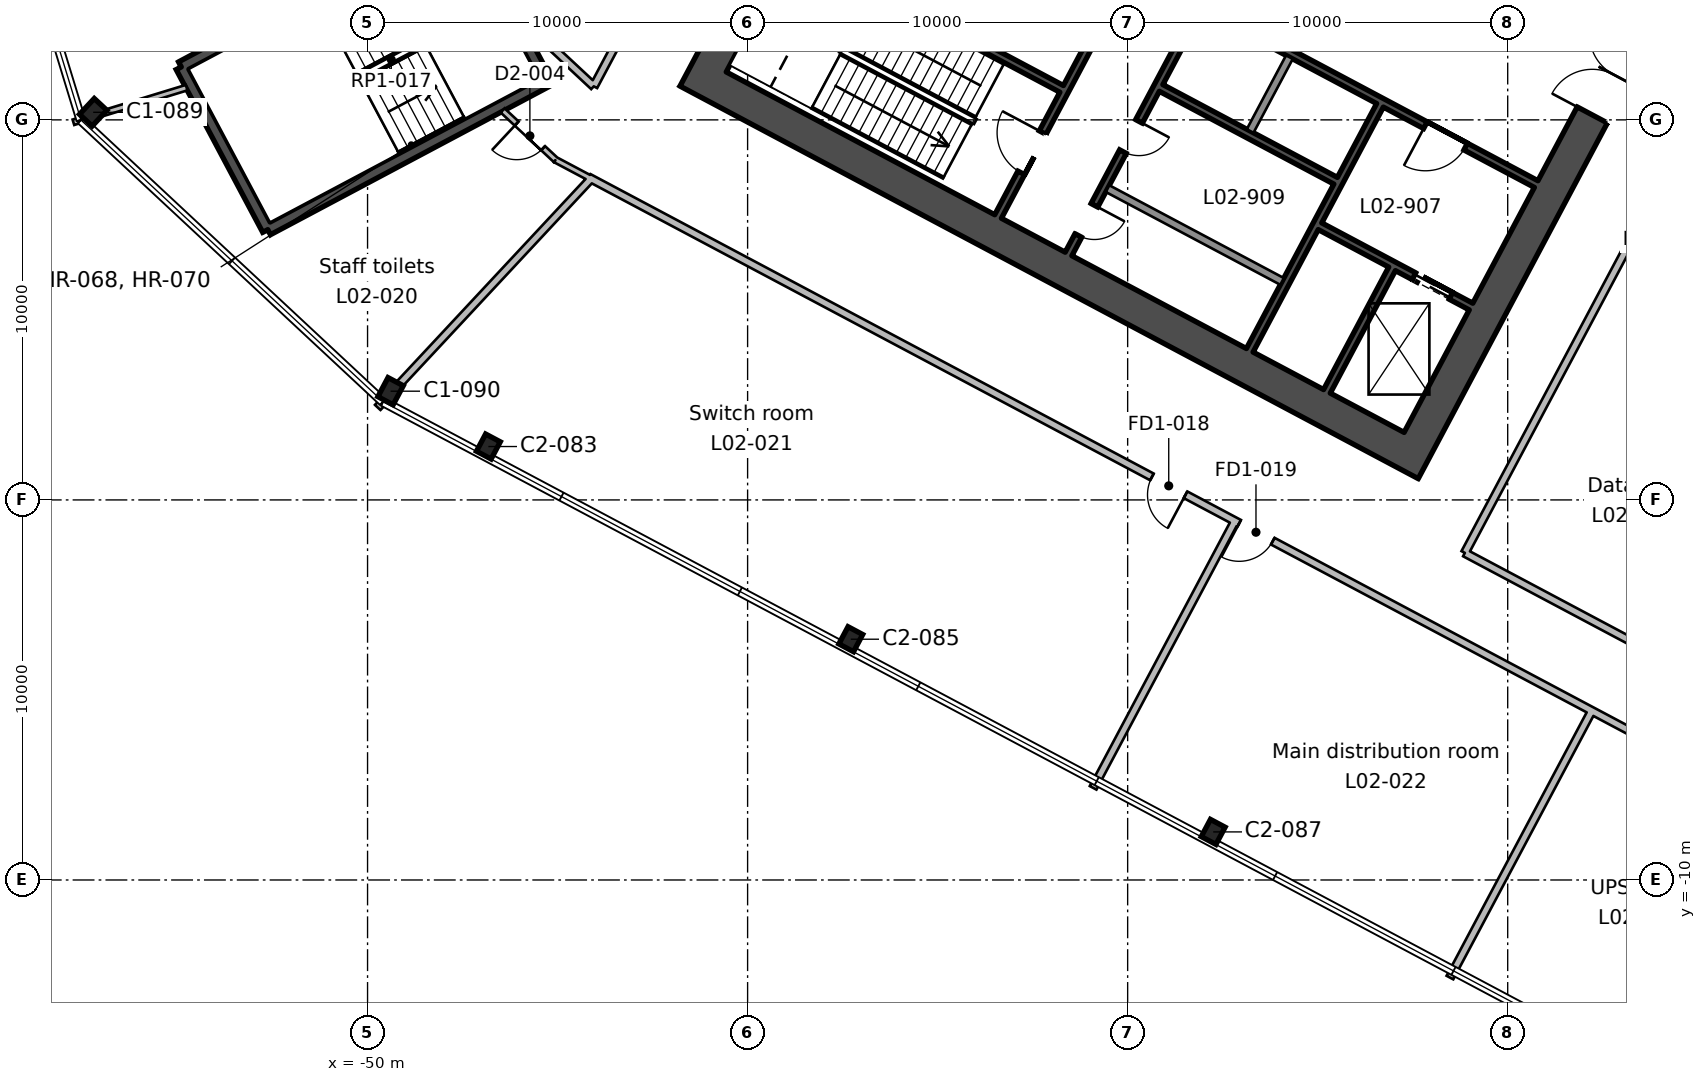
"""IFC4 building model, lengths in metres.
Left out: names, types, materials, properties, quantities, classifications, styles, units other than length and angle.
Written with IfcOpenShell. Run it as: python <this file> out.ifc"""

import sys

from ifc_helpers import new_model, si_unit, direction, frame, frame_2d, origin, origin_2d, place, context, subcontext, project, spatial, rectangle, i_section, extrude, element, fill, save


model = new_model("IFC4")
c1 = context("Model", 3, precision=1e-05, world=origin(), true_north=direction((0.0, 1.0)))
c2 = subcontext(c1, "Body", "Model", "MODEL_VIEW")
j1 = project(units=[si_unit("LENGTHUNIT", "METRE"), si_unit("PLANEANGLEUNIT", "RADIAN")], contexts=[c1])
p1 = place(None, origin())
s1 = spatial("IfcSite", under=j1, at=p1, CompositionType="ELEMENT")
p2 = place(p1, origin())
s2 = spatial("IfcBuilding", under=s1, at=p2, CompositionType="ELEMENT")
p3 = place(p2, frame((0.0, 0.0, 12.2)))
s3 = spatial("IfcBuildingStorey", under=s2, at=p3, CompositionType="ELEMENT", Elevation=12.2)
for number, where, z_axis, x_axis in (
    (1, (-27.749, -8.735, 0.0), (0.0, 0.0, 1.0), (0.883, -0.469, 0.0)),
    (2, (-37.285, -3.665, 0.0), (0.0, 0.0, 1.0), (0.883, -0.469, 0.0)),
    (3, (-46.821, 1.405, 0.0), (0.0, 0.0, 1.0), (0.883, -0.469, 0.0)),
):
    element("IfcColumn", number, at=place(p3, frame(where, z_axis=z_axis, x_axis=x_axis)), inside=s3, PredefinedType="COLUMN", context=c2, shape_type="SweptSolid", body=[
        extrude(i_section(OverallWidth=0.437, OverallDepth=0.513, WebThickness=0.061, FlangeThickness=0.097, FilletRadius=0.015, at=origin_2d()), origin(), (0.0, 0.0, 1.0), 5.4),
    ])
for number, where, z_axis, x_axis in (
    (4, (-49.394, 2.861, 0.0), (0.0, 0.0, 1.0), (0.883, -0.469, 0.0)),
    (5, (-57.219, 10.199, 0.0), (0.0, 0.0, 1.0), (0.731, -0.682, 0.0)),
):
    element("IfcColumn", number, at=place(p3, frame(where, z_axis=z_axis, x_axis=x_axis)), inside=s3, PredefinedType="COLUMN", context=c2, shape_type="SweptSolid", body=[
        extrude(i_section(OverallWidth=0.455, OverallDepth=0.569, WebThickness=0.078, FlangeThickness=0.125, FilletRadius=0.015, at=origin_2d()), origin(), (0.0, 0.0, 1.0), 5.4),
    ])
p4 = place(p3, frame((-13.362, 18.43, 0.0), z_axis=(0.0, 0.0, 1.0), x_axis=(-0.46947084998, -0.882947971864, 0.0)))
e6 = element("IfcWall", 6, at=p4, inside=s3, PredefinedType="SHEAR", context=c2, shape_type="SweptSolid", body=[
    extrude(rectangle(XDim=20.0, YDim=0.9, at=frame_2d((10.0, 0.0))), origin(), (0.0, 0.0, 1.0), 5.4),
])
p5 = place(p4, frame((7.0, 0.0, 0.0)))
e7 = element("IfcOpeningElement", 7, at=p5, cuts=e6, PredefinedType="OPENING", context=c2, shape_type="SweptSolid", body=[
    extrude(rectangle(XDim=2.4, YDim=2.4, at=frame_2d((1.2, 1.2))), frame((0.0, 0.46, 0.0), z_axis=(0.0, -1.0, 0.0), x_axis=(1.0, 0.0, 0.0)), (0.0, 0.0, 1.0), 0.92),
])
p6 = place(p3, frame((-31.992, 28.336, 0.0), z_axis=(0.0, 0.0, 1.0), x_axis=(-0.46947084998, -0.882947971864, 0.0)))
e8 = element("IfcWall", 8, at=p6, inside=s3, PredefinedType="SHEAR", context=c2, shape_type="SweptSolid", body=[
    extrude(rectangle(XDim=20.0, YDim=0.9, at=frame_2d((10.0, 0.0))), origin(), (0.0, 0.0, 1.0), 5.4),
])
p7 = place(p6, frame((10.6, 0.0, 0.0)))
e9 = element("IfcOpeningElement", 9, at=p7, cuts=e8, PredefinedType="OPENING", context=c2, shape_type="SweptSolid", body=[
    extrude(rectangle(XDim=2.4, YDim=2.4, at=frame_2d((1.2, 1.2))), frame((0.0, 0.46, 0.0), z_axis=(0.0, -1.0, 0.0), x_axis=(1.0, 0.0, 0.0)), (0.0, 0.0, 1.0), 0.92),
])
p8 = place(p3, frame((-22.937, 1.38, 0.0), z_axis=(0.0, 0.0, 1.0), x_axis=(-0.88295276571, 0.46946183394, 0.0)))
e10 = element("IfcWall", 10, at=p8, inside=s3, PredefinedType="SHEAR", context=c2, shape_type="SweptSolid", body=[
    extrude(rectangle(XDim=20.2, YDim=0.9, at=frame_2d((10.1, 0.0))), origin(), (0.0, 0.0, 1.0), 5.4),
])
p9 = place(p3, frame((-23.043, 6.08, 0.0), z_axis=(0.0, 0.0, 1.0), x_axis=(-0.469494272526, -0.882935517501, 0.0)))
e11 = element("IfcWall", 11, at=p9, inside=s3, PredefinedType="SHEAR", context=c2, shape_type="SweptSolid", body=[
    extrude(rectangle(XDim=3.65, YDim=0.2, at=frame_2d((1.825, 0.0))), origin(), (0.0, 0.0, 1.0), 5.4),
])
p10 = place(p3, frame((-23.36, 10.382, 0.0), z_axis=(0.0, 0.0, 1.0), x_axis=(-0.469480409012, -0.88294288918, 0.0)))
e12 = element("IfcWall", 12, at=p10, inside=s3, PredefinedType="SHEAR", context=c2, shape_type="SweptSolid", body=[
    extrude(rectangle(XDim=7.3, YDim=0.2, at=frame_2d((3.65, 0.0))), origin(), (0.0, 0.0, 1.0), 5.4),
])
p11 = place(p3, frame((-25.744, 11.65, 0.0), z_axis=(0.0, 0.0, 1.0), x_axis=(-0.469487830541, -0.882938942948, 0.0)))
e13 = element("IfcWall", 13, at=p11, inside=s3, PredefinedType="SOLIDWALL", context=c2, shape_type="SweptSolid", body=[
    extrude(rectangle(XDim=2.2, YDim=0.2, at=frame_2d((1.1, 0.0))), origin(), (0.0, 0.0, 1.0), 5.4),
])
p12 = place(p3, frame((-28.128, 12.917, 0.0), z_axis=(0.0, 0.0, 1.0), x_axis=(-0.469454336211, -0.882956752176, 0.0)))
e14 = element("IfcWall", 14, at=p12, inside=s3, PredefinedType="SHEAR", context=c2, shape_type="SweptSolid", body=[
    extrude(rectangle(XDim=7.3, YDim=0.2, at=frame_2d((3.65, 0.0))), origin(), (0.0, 0.0, 1.0), 5.4),
])
p13 = place(p12, frame((3.35, 0.0, 0.0)))
e15 = element("IfcOpeningElement", 15, at=p13, cuts=e14, PredefinedType="OPENING", context=c2, shape_type="SweptSolid", body=[
    extrude(rectangle(XDim=0.9, YDim=2.1, at=frame_2d((0.45, 1.05))), frame((0.0, 0.11, 0.0), z_axis=(0.0, -1.0, 0.0), x_axis=(1.0, 0.0, 0.0)), (0.0, 0.0, 1.0), 0.22),
])
p14 = place(p12, frame((5.85, 0.0, 0.0)))
e16 = element("IfcOpeningElement", 16, at=p14, cuts=e14, PredefinedType="OPENING", context=c2, shape_type="SweptSolid", body=[
    extrude(rectangle(XDim=0.9, YDim=2.1, at=frame_2d((0.45, 1.05))), frame((0.0, 0.11, 0.0), z_axis=(0.0, -1.0, 0.0), x_axis=(1.0, 0.0, 0.0)), (0.0, 0.0, 1.0), 0.22),
])
p15 = place(p3, frame((-29.982, 13.903, 0.0), z_axis=(0.0, 0.0, 1.0), x_axis=(-0.469454336211, -0.882956752176, 0.0)))
e17 = element("IfcWall", 17, at=p15, inside=s3, PredefinedType="SHEAR", context=c2, shape_type="SweptSolid", body=[
    extrude(rectangle(XDim=7.3, YDim=0.2, at=frame_2d((3.65, 0.0))), origin(), (0.0, 0.0, 1.0), 5.4),
])
p16 = place(p15, frame((4.8, 0.0, 0.0)))
e18 = element("IfcOpeningElement", 18, at=p16, cuts=e17, PredefinedType="OPENING", context=c2, shape_type="SweptSolid", body=[
    extrude(rectangle(XDim=1.2, YDim=2.1, at=frame_2d((0.6, 1.05))), frame((0.0, 0.11, 0.0), z_axis=(0.0, -1.0, 0.0), x_axis=(1.0, 0.0, 0.0)), (0.0, 0.0, 1.0), 0.22),
])
p17 = place(p3, frame((-19.252, 8.311, 0.0), z_axis=(0.0, 0.0, 1.0), x_axis=(-0.882955722218, 0.469456273365, 0.0)))
e19 = element("IfcWall", 19, at=p17, inside=s3, PredefinedType="SHEAR", context=c2, shape_type="SweptSolid", body=[
    extrude(rectangle(XDim=10.0, YDim=0.2, at=frame_2d((5.0, 0.0))), origin(), (0.0, 0.0, 1.0), 5.4),
])
p18 = place(p17, frame((2.1, 0.0, 0.0)))
e20 = element("IfcOpeningElement", 20, at=p18, cuts=e19, PredefinedType="OPENING", context=c2, shape_type="SweptSolid", body=[
    extrude(rectangle(XDim=1.2, YDim=2.1, at=frame_2d((0.6, 1.05))), frame((0.0, 0.11, 0.0), z_axis=(0.0, -1.0, 0.0), x_axis=(1.0, 0.0, 0.0)), (0.0, 0.0, 1.0), 0.22),
])
p19 = place(p3, frame((-24.528, 8.398, 0.0), z_axis=(0.0, 0.0, 1.0), x_axis=(-0.882953967957, 0.469459572775, 0.0)))
e21 = element("IfcWall", 21, at=p19, inside=s3, PredefinedType="SHEAR", context=c2, shape_type="SweptSolid", body=[
    extrude(rectangle(XDim=5.2, YDim=0.2, at=frame_2d((2.6, 0.0))), origin(), (0.0, 0.0, 1.0), 5.4),
])
p20 = place(p3, frame((-20.965, 5.088, 0.0), z_axis=(0.0, 0.0, 1.0), x_axis=(-0.882925986334, 0.469512196493, 0.0)))
e22 = element("IfcWall", 22, at=p20, inside=s3, PredefinedType="SHEAR", context=c2, shape_type="SweptSolid", body=[
    extrude(rectangle(XDim=4.5, YDim=0.2, at=frame_2d((2.25, 0.0))), origin(), (0.0, 0.0, 1.0), 5.4),
])
p21 = place(p20, frame((0.6, 0.0, 0.0)))
e23 = element("IfcOpeningElement", 23, at=p21, cuts=e22, PredefinedType="OPENING", context=c2, shape_type="SweptSolid", body=[
    extrude(rectangle(XDim=1.1, YDim=2.1, at=frame_2d((0.55, 1.05))), frame((0.0, 0.11, 0.0), z_axis=(0.0, -1.0, 0.0), x_axis=(1.0, 0.0, 0.0)), (0.0, 0.0, 1.0), 0.22),
])
p22 = place(p3, frame((-31.737, 10.816, 0.0), z_axis=(0.0, 0.0, 1.0), x_axis=(-0.882940221191, 0.469485426614, 0.0)))
e24 = element("IfcWall", 24, at=p22, inside=s3, PredefinedType="SHEAR", context=c2, shape_type="SweptSolid", body=[
    extrude(rectangle(XDim=8.0, YDim=0.2, at=frame_2d((4.0, 0.0))), origin(), (0.0, 0.0, 1.0), 5.4),
])
p23 = place(p3, frame((-25.937, 5.75, 0.0), z_axis=(0.0, 0.0, 1.0), x_axis=(-0.882934506056, 0.469496174655, 0.0)))
e25 = element("IfcWall", 25, at=p23, inside=s3, PredefinedType="SOLIDWALL", context=c2, shape_type="SweptSolid", body=[
    extrude(rectangle(XDim=5.2, YDim=0.2, at=frame_2d((2.6, 0.0))), origin(), (0.0, 0.0, 1.0), 5.4),
])
p24 = place(p3, frame((-47.574, 15.29, 0.0), z_axis=(0.0, 0.0, 1.0), x_axis=(0.469443498566, -0.882962514297, 0.0)))
e26 = element("IfcWall", 26, at=p24, inside=s3, PredefinedType="SHEAR", context=c2, shape_type="SweptSolid", body=[
    extrude(rectangle(XDim=4.85, YDim=0.3, at=frame_2d((2.425, 0.0))), origin(), (0.0, 0.0, 1.0), 5.4),
])
p25 = place(p3, frame((-45.297, 11.007, 0.0), z_axis=(0.0, 0.0, 1.0), x_axis=(-0.882951519127, -0.469464178475, 0.0)))
e27 = element("IfcWall", 27, at=p25, inside=s3, PredefinedType="SHEAR", context=c2, shape_type="SweptSolid", body=[
    extrude(rectangle(XDim=8.3, YDim=0.3, at=frame_2d((4.15, 0.0))), origin(), (0.0, 0.0, 1.0), 5.4),
])
p26 = place(p3, frame((-52.626, 7.111, 0.0), z_axis=(0.0, 0.0, 1.0), x_axis=(-0.469464364128, 0.882951420416, 0.0)))
e28 = element("IfcWall", 28, at=p26, inside=s3, PredefinedType="SHEAR", context=c2, shape_type="SweptSolid", body=[
    extrude(rectangle(XDim=4.85, YDim=0.3, at=frame_2d((2.425, 0.0))), origin(), (0.0, 0.0, 1.0), 5.4),
])
p27 = place(p3, frame((-54.903, 11.393, 0.0), z_axis=(0.0, 0.0, 1.0), x_axis=(0.882939326045, 0.469487110071, 0.0)))
e29 = element("IfcWall", 29, at=p27, inside=s3, PredefinedType="SHEAR", context=c2, shape_type="SweptSolid", body=[
    extrude(rectangle(XDim=8.3, YDim=0.3, at=frame_2d((4.15, 0.0))), origin(), (0.0, 0.0, 1.0), 5.4),
])
p28 = place(p27, frame((6.05, 0.0, 0.0)))
e30 = element("IfcOpeningElement", 30, at=p28, cuts=e29, PredefinedType="OPENING", context=c2, shape_type="SweptSolid", body=[
    extrude(rectangle(XDim=1.9, YDim=2.1, at=frame_2d((0.95, 1.05))), frame((0.0, 0.16, 0.0), z_axis=(0.0, -1.0, 0.0), x_axis=(1.0, 0.0, 0.0)), (0.0, 0.0, 1.0), 0.32),
])
p29 = place(p3, frame((-54.761, 10.848, 0.0), z_axis=(0.0, 0.0, 1.0), x_axis=(-0.956301064033, -0.29238378021, 0.0)))
e31 = element("IfcWall", 31, at=p29, inside=s3, PredefinedType="PARTITIONING", context=c2, shape_type="SweptSolid", body=[
    extrude(rectangle(XDim=3.115, YDim=0.15, at=frame_2d((1.558, 0.0))), origin(), (0.0, 0.0, 1.0), 4.95),
])
p30 = place(p3, frame((-44.12, 8.452, 0.0), z_axis=(0.0, 0.0, 1.0), x_axis=(-0.682009555742, -0.731343261319, 0.0)))
e32 = element("IfcWall", 32, at=p30, inside=s3, PredefinedType="PARTITIONING", context=c2, shape_type="SweptSolid", body=[
    extrude(rectangle(XDim=8.23, YDim=0.2, at=frame_2d((4.115, 0.0))), origin(), (0.0, 0.0, 1.0), 4.95),
])
p31 = place(p3, frame((-27.176, -0.557, 0.0), z_axis=(0.0, 0.0, 1.0), x_axis=(-0.469551855795, -0.882904895625, 0.0)))
e33 = element("IfcWall", 33, at=p31, inside=s3, PredefinedType="PARTITIONING", context=c2, shape_type="SweptSolid", body=[
    extrude(rectangle(XDim=7.95, YDim=0.2, at=frame_2d((3.975, 0.0))), origin(), (0.0, 0.0, 1.0), 4.95),
])
p32 = place(p3, frame((-33.652, 30.431, 0.0), z_axis=(0.0, 0.0, 1.0), x_axis=(-0.469497028511, -0.882934052021, 0.0)))
e34 = element("IfcWall", 34, at=p32, inside=s3, PredefinedType="PARTITIONING", context=c2, shape_type="SweptSolid", body=[
    extrude(rectangle(XDim=22.141, YDim=0.2, at=frame_2d((11.07, 0.0))), origin(), (0.0, 0.0, 1.0), 4.95),
])
p33 = place(p32, frame((10.55, 0.0, 0.0)))
e35 = element("IfcOpeningElement", 35, at=p33, cuts=e34, PredefinedType="OPENING", context=c2, shape_type="SweptSolid", body=[
    extrude(rectangle(XDim=1.0, YDim=2.1, at=frame_2d((0.5, 1.05))), frame((0.0, 0.11, 0.0), z_axis=(0.0, -1.0, 0.0), x_axis=(1.0, 0.0, 0.0)), (0.0, 0.0, 1.0), 0.22),
])
p34 = place(p3, frame((-44.047, 10.882, 0.0), z_axis=(0.0, 0.0, 1.0), x_axis=(-0.731253434149, 0.682105867916, 0.0)))
e36 = element("IfcWall", 36, at=p34, inside=s3, PredefinedType="PARTITIONING", context=c2, shape_type="SweptSolid", body=[
    extrude(rectangle(XDim=2.663, YDim=0.2, at=frame_2d((1.331, 0.0))), origin(), (0.0, 0.0, 1.0), 4.95),
])
p35 = place(p3, frame((-44.182, 8.486, 0.0), z_axis=(0.0, 0.0, 1.0), x_axis=(-0.883256863702, 0.468889446163, 0.0)))
e37 = element("IfcWall", 37, at=p35, inside=s3, PredefinedType="PARTITIONING", context=c2, shape_type="SweptSolid", body=[
    extrude(rectangle(XDim=0.985, YDim=0.15, at=frame_2d((0.493, 0.0))), origin(), (0.0, 0.0, 1.0), 4.95),
])
p36 = place(p3, frame((-45.052, 8.948, 0.0), z_axis=(0.0, 0.0, 1.0), x_axis=(-0.731400259701, 0.681948429215, 0.0)))
e38 = element("IfcWall", 38, at=p36, inside=s3, PredefinedType="PARTITIONING", context=c2, shape_type="SweptSolid", body=[
    extrude(rectangle(XDim=1.906, YDim=0.15, at=frame_2d((0.953, 0.0))), origin(), (0.0, 0.0, 1.0), 4.95),
])
p37 = place(p36, frame((0.45, 0.0, 0.0)))
e39 = element("IfcOpeningElement", 39, at=p37, cuts=e38, PredefinedType="OPENING", context=c2, shape_type="SweptSolid", body=[
    extrude(rectangle(XDim=0.95, YDim=2.1, at=frame_2d((0.475, 1.05))), frame((0.0, 0.085, 0.0), z_axis=(0.0, -1.0, 0.0), x_axis=(1.0, 0.0, 0.0)), (0.0, 0.0, 1.0), 0.17),
])
p38 = place(p3, frame((-13.6, -7.775, 0.0), z_axis=(0.0, 0.0, 1.0), x_axis=(-0.882943264249, 0.469479703626, 0.0)))
e40 = element("IfcWall", 40, at=p38, inside=s3, PredefinedType="PARTITIONING", context=c2, shape_type="SweptSolid", body=[
    extrude(rectangle(XDim=34.636, YDim=0.2, at=frame_2d((17.318, 0.0))), origin(), (0.0, 0.0, 1.0), 4.95),
])
p39 = place(p38, frame((16.85, 0.0, 0.0)))
e41 = element("IfcOpeningElement", 41, at=p39, cuts=e40, PredefinedType="OPENING", context=c2, shape_type="SweptSolid", body=[
    extrude(rectangle(XDim=1.0, YDim=2.1, at=frame_2d((0.5, 1.05))), frame((0.0, 0.11, 0.0), z_axis=(0.0, -1.0, 0.0), x_axis=(1.0, 0.0, 0.0)), (0.0, 0.0, 1.0), 0.22),
])
p40 = place(p38, frame((14.25, 0.0, 0.0)))
e42 = element("IfcOpeningElement", 42, at=p40, cuts=e40, PredefinedType="OPENING", context=c2, shape_type="SweptSolid", body=[
    extrude(rectangle(XDim=1.0, YDim=2.1, at=frame_2d((0.5, 1.05))), frame((0.0, 0.11, 0.0), z_axis=(0.0, -1.0, 0.0), x_axis=(1.0, 0.0, 0.0)), (0.0, 0.0, 1.0), 0.22),
])
p41 = place(p3, frame((-17.787, -5.549, 0.0), z_axis=(0.0, 0.0, 1.0), x_axis=(-0.469551855795, -0.882904895625, 0.0)))
e43 = element("IfcWall", 43, at=p41, inside=s3, PredefinedType="PARTITIONING", context=c2, shape_type="SweptSolid", body=[
    extrude(rectangle(XDim=7.95, YDim=0.2, at=frame_2d((3.975, 0.0))), origin(), (0.0, 0.0, 1.0), 4.95),
])
p42 = place(p3, frame((-21.128, -1.394, 0.0), z_axis=(0.0, 0.0, 1.0), x_axis=(0.46951219964, 0.882925984661, 0.0)))
e44 = element("IfcWall", 44, at=p42, inside=s3, PredefinedType="PARTITIONING", context=c2, shape_type="SweptSolid", body=[
    extrude(rectangle(XDim=22.3, YDim=0.2, at=frame_2d((11.15, 0.0))), origin(), (0.0, 0.0, 1.0), 4.95),
])
p43 = place(p42, frame((10.65, 0.0, 0.0)))
e45 = element("IfcOpeningElement", 45, at=p43, cuts=e44, PredefinedType="OPENING", context=c2, shape_type="SweptSolid", body=[
    extrude(rectangle(XDim=1.0, YDim=2.1, at=frame_2d((0.5, 1.05))), frame((0.0, 0.11, 0.0), z_axis=(0.0, -1.0, 0.0), x_axis=(1.0, 0.0, 0.0)), (0.0, 0.0, 1.0), 0.22),
])
p44 = place(p3, frame((-13.6, -5.397, 0.0), z_axis=(0.0, 0.0, 1.0), x_axis=(-0.882932501381, 0.469499944627, 0.0)))
e46 = element("IfcWall", 46, at=p44, inside=s3, PredefinedType="PARTITIONING", context=c2, shape_type="SweptSolid", body=[
    extrude(rectangle(XDim=8.526, YDim=0.2, at=frame_2d((4.263, 0.0))), origin(), (0.0, 0.0, 1.0), 4.95),
])
p45 = place(p5, frame((2.4, 0.0, 0.0), z_axis=(0.0, 0.0, 1.0), x_axis=(-1.0, 0.0, 0.0)))
e47 = element("IfcDoor", 47, at=p45, inside=s3, OperationType="DOUBLE_DOOR_SINGLE_SWING", PredefinedType="DOOR", context=c2, shape_type="SweptSolid", body=[
    extrude(rectangle(XDim=2.4, YDim=2.4, at=frame_2d((1.2, 1.2))), frame((0.0, 0.025, 0.0), z_axis=(0.0, -1.0, 0.0), x_axis=(1.0, 0.0, 0.0)), (0.0, 0.0, 1.0), 0.05),
])
fill(e7, e47)
p46 = place(p18, origin())
e48 = element("IfcDoor", 48, at=p46, inside=s3, OperationType="SINGLE_SWING_RIGHT", PredefinedType="DOOR", context=c2, shape_type="SweptSolid", body=[
    extrude(rectangle(XDim=1.2, YDim=2.1, at=frame_2d((0.6, 1.05))), frame((0.0, 0.025, 0.0), z_axis=(0.0, -1.0, 0.0), x_axis=(1.0, 0.0, 0.0)), (0.0, 0.0, 1.0), 0.05),
])
fill(e20, e48)
p47 = place(p16, frame((1.2, 0.0, 0.0), z_axis=(0.0, 0.0, 1.0), x_axis=(-1.0, 0.0, 0.0)))
e49 = element("IfcDoor", 49, at=p47, inside=s3, OperationType="SINGLE_SWING_RIGHT", PredefinedType="DOOR", context=c2, shape_type="SweptSolid", body=[
    extrude(rectangle(XDim=1.2, YDim=2.1, at=frame_2d((0.6, 1.05))), frame((0.0, 0.025, 0.0), z_axis=(0.0, -1.0, 0.0), x_axis=(1.0, 0.0, 0.0)), (0.0, 0.0, 1.0), 0.05),
])
fill(e18, e49)
p48 = place(p21, origin())
e50 = element("IfcDoor", 50, at=p48, inside=s3, OperationType="DOUBLE_DOOR_SLIDING", PredefinedType="DOOR", context=c2, shape_type="SweptSolid", body=[
    extrude(rectangle(XDim=1.1, YDim=2.1, at=frame_2d((0.55, 1.05))), frame((0.0, 0.025, 0.0), z_axis=(0.0, -1.0, 0.0), x_axis=(1.0, 0.0, 0.0)), (0.0, 0.0, 1.0), 0.05),
])
fill(e23, e50)
p49 = place(p13, origin())
e51 = element("IfcDoor", 51, at=p49, inside=s3, OperationType="SINGLE_SWING_LEFT", PredefinedType="DOOR", context=c2, shape_type="SweptSolid", body=[
    extrude(rectangle(XDim=0.9, YDim=2.1, at=frame_2d((0.45, 1.05))), frame((0.0, 0.025, 0.0), z_axis=(0.0, -1.0, 0.0), x_axis=(1.0, 0.0, 0.0)), (0.0, 0.0, 1.0), 0.05),
])
fill(e15, e51)
p50 = place(p14, origin())
e52 = element("IfcDoor", 52, at=p50, inside=s3, OperationType="SINGLE_SWING_LEFT", PredefinedType="DOOR", context=c2, shape_type="SweptSolid", body=[
    extrude(rectangle(XDim=0.9, YDim=2.1, at=frame_2d((0.45, 1.05))), frame((0.0, 0.025, 0.0), z_axis=(0.0, -1.0, 0.0), x_axis=(1.0, 0.0, 0.0)), (0.0, 0.0, 1.0), 0.05),
])
fill(e16, e52)
p51 = place(p37, origin())
e53 = element("IfcDoor", 53, at=p51, inside=s3, OperationType="SINGLE_SWING_RIGHT", PredefinedType="DOOR", context=c2, shape_type="SweptSolid", body=[
    extrude(rectangle(XDim=0.95, YDim=2.1, at=frame_2d((0.475, 1.05))), frame((0.0, 0.025, 0.0), z_axis=(0.0, -1.0, 0.0), x_axis=(1.0, 0.0, 0.0)), (0.0, 0.0, 1.0), 0.05),
])
fill(e39, e53)
p52 = place(p39, origin())
e54 = element("IfcDoor", 54, at=p52, inside=s3, OperationType="SINGLE_SWING_LEFT", PredefinedType="DOOR", context=c2, shape_type="SweptSolid", body=[
    extrude(rectangle(XDim=1.0, YDim=2.1, at=frame_2d((0.5, 1.05))), frame((0.0, 0.025, 0.0), z_axis=(0.0, -1.0, 0.0), x_axis=(1.0, 0.0, 0.0)), (0.0, 0.0, 1.0), 0.05),
])
fill(e41, e54)
p53 = place(p40, origin())
e55 = element("IfcDoor", 55, at=p53, inside=s3, OperationType="SINGLE_SWING_RIGHT", PredefinedType="DOOR", context=c2, shape_type="SweptSolid", body=[
    extrude(rectangle(XDim=1.0, YDim=2.1, at=frame_2d((0.5, 1.05))), frame((0.0, 0.025, 0.0), z_axis=(0.0, -1.0, 0.0), x_axis=(1.0, 0.0, 0.0)), (0.0, 0.0, 1.0), 0.05),
])
fill(e42, e55)
save(model, sys.argv[1])
